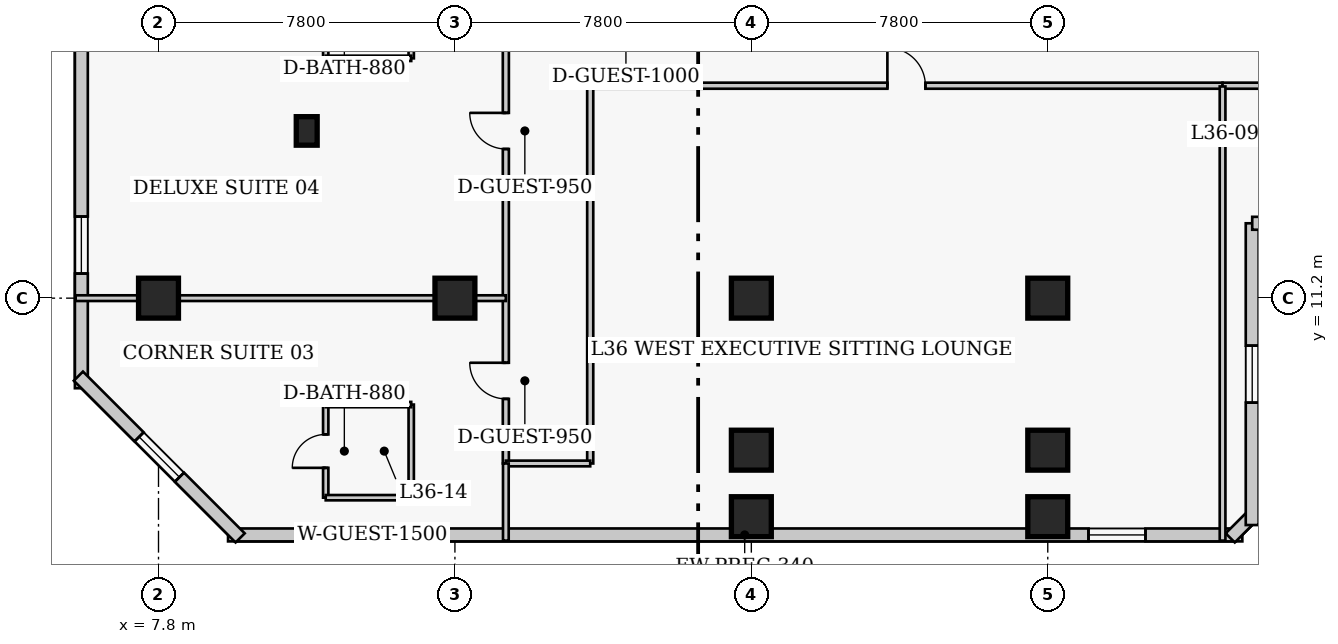
"""IFC4 building model, lengths in metres.
Left out: names, types, materials, properties, quantities, classifications, styles, units other than length and angle.
Written with IfcOpenShell. Run it as: python <this file> out.ifc"""

import sys

from ifc_helpers import new_model, si_unit, direction, frame, frame_2d, origin, origin_2d, place, context, subcontext, project, spatial, rectangle, extrude, element, fill, save


model = new_model("IFC4")
c1 = context("Model", 3, precision=1e-05, world=origin(), true_north=direction((0.0, 1.0)))
c2 = subcontext(c1, "Body", "Model", "MODEL_VIEW")
j1 = project(units=[si_unit("LENGTHUNIT", "METRE"), si_unit("PLANEANGLEUNIT", "RADIAN")], contexts=[c1])
p1 = place(None, origin())
s1 = spatial("IfcSite", under=j1, at=p1, CompositionType="ELEMENT")
p2 = place(p1, origin())
s2 = spatial("IfcBuilding", under=s1, at=p2, CompositionType="ELEMENT")
p3 = place(p2, frame((0.0, 0.0, 146.0)))
s3 = spatial("IfcBuildingStorey", under=s2, at=p3, CompositionType="ELEMENT", Elevation=146.0)
for number, where, z_axis, x_axis in (
    (1, (7.8, 11.2, 0.0), (0.0, 0.0, 1.0), (1.0, 0.0, 0.0)),
    (2, (15.6, 11.2, 0.0), (0.0, 0.0, 1.0), (1.0, 0.0, 0.0)),
    (3, (23.4, 11.2, 0.0), (0.0, 0.0, 1.0), (1.0, 0.0, 0.0)),
    (4, (31.2, 11.2, 0.0), (0.0, 0.0, 1.0), (1.0, 0.0, 0.0)),
    (5, (23.4, 7.2, 0.0), (0.0, 0.0, 1.0), (1.0, 0.0, 0.0)),
    (6, (31.2, 7.2, 0.0), (0.0, 0.0, 1.0), (1.0, 0.0, 0.0)),
    (7, (23.4, 5.45, 0.0), (0.0, 0.0, 1.0), (1.0, 0.0, 0.0)),
    (8, (31.2, 5.45, 0.0), (0.0, 0.0, 1.0), (1.0, 0.0, 0.0)),
):
    element("IfcColumn", number, at=place(p3, frame(where, z_axis=z_axis, x_axis=x_axis)), inside=s3, PredefinedType="COLUMN", context=c2, shape_type="SweptSolid", body=[
        extrude(rectangle(XDim=1.05, YDim=1.05, at=origin_2d()), origin(), (0.0, 0.0, 1.0), 3.8),
    ])
p4 = place(p3, frame((11.7, 15.6, 0.0), z_axis=(0.0, 0.0, 1.0), x_axis=(1.0, 0.0, 0.0)))
e9 = element("IfcColumn", 9, at=p4, inside=s3, PredefinedType="PILASTER", context=c2, shape_type="SweptSolid", body=[
    extrude(rectangle(XDim=0.55, YDim=0.75, at=origin_2d()), origin(), (0.0, 0.0, 1.0), 3.8),
])
p5 = place(p3, frame((9.63, 4.97, 0.0), z_axis=(0.0, 0.0, 1.0), x_axis=(1.0, 0.0, 0.0)))
e10 = element("IfcWall", 10, at=p5, inside=s3, PredefinedType="SOLIDWALL", context=c2, shape_type="SweptSolid", body=[
    extrude(rectangle(XDim=26.69, YDim=0.34, at=frame_2d((13.345, 0.0))), origin(), (0.0, 0.0, 1.0), 3.55),
])
p6 = place(p5, frame((3.048, 0.0, 0.85)))
e11 = element("IfcOpeningElement", 11, at=p6, cuts=e10, PredefinedType="OPENING", context=c2, shape_type="SweptSolid", body=[
    extrude(rectangle(XDim=1.5, YDim=1.75, at=frame_2d((0.75, 0.875))), frame((0.0, 0.18, 0.0), z_axis=(0.0, -1.0, 0.0), x_axis=(1.0, 0.0, 0.0)), (0.0, 0.0, 1.0), 0.36),
])
p7 = place(p5, frame((22.642, 0.0, 0.85)))
e12 = element("IfcOpeningElement", 12, at=p7, cuts=e10, PredefinedType="OPENING", context=c2, shape_type="SweptSolid", body=[
    extrude(rectangle(XDim=1.5, YDim=1.75, at=frame_2d((0.75, 0.875))), frame((0.0, 0.18, 0.0), z_axis=(0.0, -1.0, 0.0), x_axis=(1.0, 0.0, 0.0)), (0.0, 0.0, 1.0), 0.36),
])
p8 = place(p3, frame((36.001, 4.892, 0.0), z_axis=(0.0, 0.0, 1.0), x_axis=(0.707106781187, 0.707106781187, 0.0)))
e13 = element("IfcWall", 13, at=p8, inside=s3, PredefinedType="SOLIDWALL", context=c2, shape_type="SweptSolid", body=[
    extrude(rectangle(XDim=0.929, YDim=0.34, at=frame_2d((0.464, 0.0))), origin(), (0.0, 0.0, 1.0), 3.55),
])
p9 = place(p3, frame((36.58, 5.23, 0.0), z_axis=(0.0, 0.0, 1.0), x_axis=(0.0, 1.0, 0.0)))
e14 = element("IfcWall", 14, at=p9, inside=s3, PredefinedType="SOLIDWALL", context=c2, shape_type="SweptSolid", body=[
    extrude(rectangle(XDim=7.94, YDim=0.34, at=frame_2d((3.97, 0.0))), origin(), (0.0, 0.0, 1.0), 3.55),
])
p10 = place(p9, frame((3.22, 0.0, 0.85)))
e15 = element("IfcOpeningElement", 15, at=p10, cuts=e14, PredefinedType="OPENING", context=c2, shape_type="SweptSolid", body=[
    extrude(rectangle(XDim=1.5, YDim=1.75, at=frame_2d((0.75, 0.875))), frame((0.0, 0.18, 0.0), z_axis=(0.0, -1.0, 0.0), x_axis=(1.0, 0.0, 0.0)), (0.0, 0.0, 1.0), 0.36),
])
p11 = place(p3, frame((36.58, 13.17, 0.0), z_axis=(0.0, 0.0, 1.0), x_axis=(1.0, 0.0, 0.0)))
e16 = element("IfcWall", 16, at=p11, inside=s3, PredefinedType="SOLIDWALL", context=c2, shape_type="SweptSolid", body=[
    extrude(rectangle(XDim=4.84, YDim=0.34, at=frame_2d((2.42, 0.0))), origin(), (0.0, 0.0, 1.0), 3.55),
])
p12 = place(p11, frame((1.67, 0.0, 0.85)))
e17 = element("IfcOpeningElement", 17, at=p12, cuts=e16, PredefinedType="OPENING", context=c2, shape_type="SweptSolid", body=[
    extrude(rectangle(XDim=1.5, YDim=1.75, at=frame_2d((0.75, 0.875))), frame((0.0, 0.18, 0.0), z_axis=(0.0, -1.0, 0.0), x_axis=(1.0, 0.0, 0.0)), (0.0, 0.0, 1.0), 0.36),
])
p13 = place(p3, frame((5.77, 38.97, 0.0), z_axis=(0.0, 0.0, 1.0), x_axis=(0.0, -1.0, 0.0)))
e18 = element("IfcWall", 18, at=p13, inside=s3, PredefinedType="SOLIDWALL", context=c2, shape_type="SweptSolid", body=[
    extrude(rectangle(XDim=30.14, YDim=0.34, at=frame_2d((15.07, 0.0))), origin(), (0.0, 0.0, 1.0), 3.55),
])
p14 = place(p13, frame((4.167, 0.0, 0.85)))
e19 = element("IfcOpeningElement", 19, at=p14, cuts=e18, PredefinedType="OPENING", context=c2, shape_type="SweptSolid", body=[
    extrude(rectangle(XDim=1.5, YDim=1.75, at=frame_2d((0.75, 0.875))), frame((0.0, 0.18, 0.0), z_axis=(0.0, -1.0, 0.0), x_axis=(1.0, 0.0, 0.0)), (0.0, 0.0, 1.0), 0.36),
])
p15 = place(p13, frame((10.552, 0.0, 0.85)))
e20 = element("IfcOpeningElement", 20, at=p15, cuts=e18, PredefinedType="OPENING", context=c2, shape_type="SweptSolid", body=[
    extrude(rectangle(XDim=1.5, YDim=1.75, at=frame_2d((0.75, 0.875))), frame((0.0, 0.18, 0.0), z_axis=(0.0, -1.0, 0.0), x_axis=(1.0, 0.0, 0.0)), (0.0, 0.0, 1.0), 0.36),
])
p16 = place(p13, frame((16.938, 0.0, 0.85)))
e21 = element("IfcOpeningElement", 21, at=p16, cuts=e18, PredefinedType="OPENING", context=c2, shape_type="SweptSolid", body=[
    extrude(rectangle(XDim=1.5, YDim=1.75, at=frame_2d((0.75, 0.875))), frame((0.0, 0.18, 0.0), z_axis=(0.0, -1.0, 0.0), x_axis=(1.0, 0.0, 0.0)), (0.0, 0.0, 1.0), 0.36),
])
p17 = place(p13, frame((25.623, 0.0, 0.85)))
e22 = element("IfcOpeningElement", 22, at=p17, cuts=e18, PredefinedType="OPENING", context=c2, shape_type="SweptSolid", body=[
    extrude(rectangle(XDim=1.5, YDim=1.75, at=frame_2d((0.75, 0.875))), frame((0.0, 0.18, 0.0), z_axis=(0.0, -1.0, 0.0), x_axis=(1.0, 0.0, 0.0)), (0.0, 0.0, 1.0), 0.36),
])
p18 = place(p3, frame((5.692, 9.148, 0.0), z_axis=(0.0, 0.0, 1.0), x_axis=(0.707106781187, -0.707106781187, 0.0)))
e23 = element("IfcWall", 23, at=p18, inside=s3, PredefinedType="SOLIDWALL", context=c2, shape_type="SweptSolid", body=[
    extrude(rectangle(XDim=6.02, YDim=0.34, at=frame_2d((3.01, 0.0))), origin(), (0.0, 0.0, 1.0), 3.55),
])
p19 = place(p18, frame((2.26, 0.0, 0.85)))
e24 = element("IfcOpeningElement", 24, at=p19, cuts=e23, PredefinedType="OPENING", context=c2, shape_type="SweptSolid", body=[
    extrude(rectangle(XDim=1.5, YDim=1.75, at=frame_2d((0.75, 0.875))), frame((0.0, 0.18, 0.0), z_axis=(0.0, -1.0, 0.0), x_axis=(1.0, 0.0, 0.0)), (0.0, 0.0, 1.0), 0.36),
])
p20 = place(p3, frame((19.1, 16.79, 0.0), z_axis=(0.0, 0.0, 1.0), x_axis=(1.0, 0.0, 0.0)))
e25 = element("IfcWall", 25, at=p20, inside=s3, PredefinedType="PARTITIONING", context=c2, shape_type="SweptSolid", body=[
    extrude(rectangle(XDim=16.7, YDim=0.16, at=frame_2d((8.35, 0.0))), origin(), (0.0, 0.0, 1.0), 3.55),
])
p21 = place(p20, frame((7.88, 0.0, 0.0)))
e26 = element("IfcOpeningElement", 26, at=p21, cuts=e25, PredefinedType="OPENING", context=c2, shape_type="SweptSolid", body=[
    extrude(rectangle(XDim=1.0, YDim=2.15, at=frame_2d((0.5, 1.075))), frame((0.0, 0.09, 0.0), z_axis=(0.0, -1.0, 0.0), x_axis=(1.0, 0.0, 0.0)), (0.0, 0.0, 1.0), 0.18),
])
p22 = place(p3, frame((35.8, 16.79, 0.0), z_axis=(0.0, 0.0, 1.0), x_axis=(1.0, 0.0, 0.0)))
e27 = element("IfcWall", 27, at=p22, inside=s3, PredefinedType="PARTITIONING", context=c2, shape_type="SweptSolid", body=[
    extrude(rectangle(XDim=23.2, YDim=0.16, at=frame_2d((11.6, 0.0))), origin(), (0.0, 0.0, 1.0), 3.55),
])
p23 = place(p22, frame((6.202, 0.0, 0.0)))
e28 = element("IfcOpeningElement", 28, at=p23, cuts=e27, PredefinedType="OPENING", context=c2, shape_type="SweptSolid", body=[
    extrude(rectangle(XDim=0.95, YDim=2.1, at=frame_2d((0.475, 1.05))), frame((0.0, 0.09, 0.0), z_axis=(0.0, -1.0, 0.0), x_axis=(1.0, 0.0, 0.0)), (0.0, 0.0, 1.0), 0.18),
])
p24 = place(p22, frame((13.413, 0.0, 0.0)))
e29 = element("IfcOpeningElement", 29, at=p24, cuts=e27, PredefinedType="OPENING", context=c2, shape_type="SweptSolid", body=[
    extrude(rectangle(XDim=1.0, YDim=2.15, at=frame_2d((0.5, 1.075))), frame((0.0, 0.09, 0.0), z_axis=(0.0, -1.0, 0.0), x_axis=(1.0, 0.0, 0.0)), (0.0, 0.0, 1.0), 0.18),
])
p25 = place(p22, frame((18.343, 0.0, 0.0)))
e30 = element("IfcOpeningElement", 30, at=p25, cuts=e27, PredefinedType="OPENING", context=c2, shape_type="SweptSolid", body=[
    extrude(rectangle(XDim=0.95, YDim=2.1, at=frame_2d((0.475, 1.05))), frame((0.0, 0.09, 0.0), z_axis=(0.0, -1.0, 0.0), x_axis=(1.0, 0.0, 0.0)), (0.0, 0.0, 1.0), 0.18),
])
p26 = place(p3, frame((16.94, 6.85, 0.0), z_axis=(0.0, 0.0, 1.0), x_axis=(0.0, 1.0, 0.0)))
e31 = element("IfcWall", 31, at=p26, inside=s3, PredefinedType="PARTITIONING", context=c2, shape_type="SweptSolid", body=[
    extrude(rectangle(XDim=33.8, YDim=0.16, at=frame_2d((16.9, 0.0))), origin(), (0.0, 0.0, 1.0), 3.55),
])
p27 = place(p26, frame((1.7, 0.0, 0.0)))
e32 = element("IfcOpeningElement", 32, at=p27, cuts=e31, PredefinedType="OPENING", context=c2, shape_type="SweptSolid", body=[
    extrude(rectangle(XDim=0.95, YDim=2.1, at=frame_2d((0.475, 1.05))), frame((0.0, 0.09, 0.0), z_axis=(0.0, -1.0, 0.0), x_axis=(1.0, 0.0, 0.0)), (0.0, 0.0, 1.0), 0.18),
])
p28 = place(p26, frame((8.275, 0.0, 0.0)))
e33 = element("IfcOpeningElement", 33, at=p28, cuts=e31, PredefinedType="OPENING", context=c2, shape_type="SweptSolid", body=[
    extrude(rectangle(XDim=0.95, YDim=2.1, at=frame_2d((0.475, 1.05))), frame((0.0, 0.09, 0.0), z_axis=(0.0, -1.0, 0.0), x_axis=(1.0, 0.0, 0.0)), (0.0, 0.0, 1.0), 0.18),
])
p29 = place(p26, frame((17.075, 0.0, 0.0)))
e34 = element("IfcOpeningElement", 34, at=p29, cuts=e31, PredefinedType="OPENING", context=c2, shape_type="SweptSolid", body=[
    extrude(rectangle(XDim=0.95, YDim=2.1, at=frame_2d((0.475, 1.05))), frame((0.0, 0.09, 0.0), z_axis=(0.0, -1.0, 0.0), x_axis=(1.0, 0.0, 0.0)), (0.0, 0.0, 1.0), 0.18),
])
p30 = place(p26, frame((24.775, 0.0, 0.0)))
e35 = element("IfcOpeningElement", 35, at=p30, cuts=e31, PredefinedType="OPENING", context=c2, shape_type="SweptSolid", body=[
    extrude(rectangle(XDim=0.95, YDim=2.1, at=frame_2d((0.475, 1.05))), frame((0.0, 0.09, 0.0), z_axis=(0.0, -1.0, 0.0), x_axis=(1.0, 0.0, 0.0)), (0.0, 0.0, 1.0), 0.18),
])
p31 = place(p26, frame((29.1, 0.0, 0.0)))
e36 = element("IfcOpeningElement", 36, at=p31, cuts=e31, PredefinedType="OPENING", context=c2, shape_type="SweptSolid", body=[
    extrude(rectangle(XDim=1.0, YDim=2.15, at=frame_2d((0.5, 1.075))), frame((0.0, 0.09, 0.0), z_axis=(0.0, -1.0, 0.0), x_axis=(1.0, 0.0, 0.0)), (0.0, 0.0, 1.0), 0.18),
])
p32 = place(p3, frame((19.16, 6.85, 0.0), z_axis=(0.0, 0.0, 1.0), x_axis=(0.0, 1.0, 0.0)))
e37 = element("IfcWall", 37, at=p32, inside=s3, PredefinedType="PARTITIONING", context=c2, shape_type="SweptSolid", body=[
    extrude(rectangle(XDim=9.94, YDim=0.16, at=frame_2d((4.97, 0.0))), origin(), (0.0, 0.0, 1.0), 3.55),
])
p33 = place(p3, frame((16.94, 6.85, 0.0), z_axis=(0.0, 0.0, 1.0), x_axis=(1.0, 0.0, 0.0)))
e38 = element("IfcWall", 38, at=p33, inside=s3, PredefinedType="PARTITIONING", context=c2, shape_type="SweptSolid", body=[
    extrude(rectangle(XDim=2.22, YDim=0.15, at=frame_2d((1.11, 0.0))), origin(), (0.0, 0.0, 1.0), 3.55),
])
p34 = place(p3, frame((35.8, 4.82, 0.0), z_axis=(0.0, 0.0, 1.0), x_axis=(0.0, 1.0, 0.0)))
e39 = element("IfcWall", 39, at=p34, inside=s3, PredefinedType="PARTITIONING", context=c2, shape_type="SweptSolid", body=[
    extrude(rectangle(XDim=11.95, YDim=0.15, at=frame_2d((5.975, 0.0))), origin(), (0.0, 0.0, 1.0), 3.55),
])
p35 = place(p3, frame((16.94, 4.82, 0.0), z_axis=(0.0, 0.0, 1.0), x_axis=(0.0, 1.0, 0.0)))
e40 = element("IfcWall", 40, at=p35, inside=s3, PredefinedType="PARTITIONING", context=c2, shape_type="SweptSolid", body=[
    extrude(rectangle(XDim=2.03, YDim=0.15, at=frame_2d((1.015, 0.0))), origin(), (0.0, 0.0, 1.0), 3.55),
])
p36 = place(p3, frame((12.2, 5.95, 0.0), z_axis=(0.0, 0.0, 1.0), x_axis=(0.0, 1.0, 0.0)))
e41 = element("IfcWall", 41, at=p36, inside=s3, PredefinedType="PLUMBINGWALL", context=c2, shape_type="SweptSolid", body=[
    extrude(rectangle(XDim=2.45, YDim=0.14, at=frame_2d((1.225, 0.0))), origin(), (0.0, 0.0, 1.0), 3.55),
])
p37 = place(p36, frame((0.785, 0.0, 0.0)))
e42 = element("IfcOpeningElement", 42, at=p37, cuts=e41, PredefinedType="OPENING", context=c2, shape_type="SweptSolid", body=[
    extrude(rectangle(XDim=0.88, YDim=2.05, at=frame_2d((0.44, 1.025))), frame((0.0, 0.08, 0.0), z_axis=(0.0, -1.0, 0.0), x_axis=(1.0, 0.0, 0.0)), (0.0, 0.0, 1.0), 0.16),
])
p38 = place(p3, frame((14.45, 5.95, 0.0), z_axis=(0.0, 0.0, 1.0), x_axis=(0.0, 1.0, 0.0)))
e43 = element("IfcWall", 43, at=p38, inside=s3, PredefinedType="PLUMBINGWALL", context=c2, shape_type="SweptSolid", body=[
    extrude(rectangle(XDim=2.45, YDim=0.14, at=frame_2d((1.225, 0.0))), origin(), (0.0, 0.0, 1.0), 3.55),
])
for number, where, z_axis, x_axis in (
    (44, (12.2, 5.95, 0.0), (0.0, 0.0, 1.0), (1.0, 0.0, 0.0)),
    (45, (12.2, 8.4, 0.0), (0.0, 0.0, 1.0), (1.0, 0.0, 0.0)),
):
    element("IfcWall", number, at=place(p3, frame(where, z_axis=z_axis, x_axis=x_axis)), inside=s3, PredefinedType="PLUMBINGWALL", context=c2, shape_type="SweptSolid", body=[
        extrude(rectangle(XDim=2.25, YDim=0.14, at=frame_2d((1.125, 0.0))), origin(), (0.0, 0.0, 1.0), 3.55),
    ])
p39 = place(p3, frame((5.62, 11.2, 0.0), z_axis=(0.0, 0.0, 1.0), x_axis=(1.0, 0.0, 0.0)))
e46 = element("IfcWall", 46, at=p39, inside=s3, PredefinedType="PARTITIONING", context=c2, shape_type="SweptSolid", body=[
    extrude(rectangle(XDim=11.32, YDim=0.15, at=frame_2d((5.66, 0.0))), origin(), (0.0, 0.0, 1.0), 2.778),
])
p40 = place(p3, frame((12.2, 17.51, 0.0), z_axis=(0.0, 0.0, 1.0), x_axis=(0.0, 1.0, 0.0)))
e47 = element("IfcWall", 47, at=p40, inside=s3, PredefinedType="PLUMBINGWALL", context=c2, shape_type="SweptSolid", body=[
    extrude(rectangle(XDim=2.45, YDim=0.14, at=frame_2d((1.225, 0.0))), origin(), (0.0, 0.0, 1.0), 3.55),
])
p41 = place(p40, frame((0.785, 0.0, 0.0)))
e48 = element("IfcOpeningElement", 48, at=p41, cuts=e47, PredefinedType="OPENING", context=c2, shape_type="SweptSolid", body=[
    extrude(rectangle(XDim=0.88, YDim=2.05, at=frame_2d((0.44, 1.025))), frame((0.0, 0.08, 0.0), z_axis=(0.0, -1.0, 0.0), x_axis=(1.0, 0.0, 0.0)), (0.0, 0.0, 1.0), 0.16),
])
p42 = place(p3, frame((14.45, 17.51, 0.0), z_axis=(0.0, 0.0, 1.0), x_axis=(0.0, 1.0, 0.0)))
e49 = element("IfcWall", 49, at=p42, inside=s3, PredefinedType="PLUMBINGWALL", context=c2, shape_type="SweptSolid", body=[
    extrude(rectangle(XDim=2.45, YDim=0.14, at=frame_2d((1.225, 0.0))), origin(), (0.0, 0.0, 1.0), 3.55),
])
p43 = place(p3, frame((12.2, 17.51, 0.0), z_axis=(0.0, 0.0, 1.0), x_axis=(1.0, 0.0, 0.0)))
e50 = element("IfcWall", 50, at=p43, inside=s3, PredefinedType="PLUMBINGWALL", context=c2, shape_type="SweptSolid", body=[
    extrude(rectangle(XDim=2.25, YDim=0.14, at=frame_2d((1.125, 0.0))), origin(), (0.0, 0.0, 1.0), 3.55),
])
p44 = place(p6, origin())
e51 = element("IfcWindow", 51, at=p44, inside=s3, PartitioningType="SINGLE_PANEL", PredefinedType="WINDOW", context=c2, shape_type="SweptSolid", body=[
    extrude(rectangle(XDim=1.5, YDim=1.75, at=frame_2d((0.75, 0.875))), frame((0.0, 0.03, 0.0), z_axis=(0.0, -1.0, 0.0), x_axis=(1.0, 0.0, 0.0)), (0.0, 0.0, 1.0), 0.06),
])
fill(e11, e51)
p45 = place(p7, origin())
e52 = element("IfcWindow", 52, at=p45, inside=s3, PartitioningType="SINGLE_PANEL", PredefinedType="WINDOW", context=c2, shape_type="SweptSolid", body=[
    extrude(rectangle(XDim=1.5, YDim=1.75, at=frame_2d((0.75, 0.875))), frame((0.0, 0.03, 0.0), z_axis=(0.0, -1.0, 0.0), x_axis=(1.0, 0.0, 0.0)), (0.0, 0.0, 1.0), 0.06),
])
fill(e12, e52)
p46 = place(p10, origin())
e53 = element("IfcWindow", 53, at=p46, inside=s3, PartitioningType="SINGLE_PANEL", PredefinedType="WINDOW", context=c2, shape_type="SweptSolid", body=[
    extrude(rectangle(XDim=1.5, YDim=1.75, at=frame_2d((0.75, 0.875))), frame((0.0, 0.03, 0.0), z_axis=(0.0, -1.0, 0.0), x_axis=(1.0, 0.0, 0.0)), (0.0, 0.0, 1.0), 0.06),
])
fill(e15, e53)
p47 = place(p17, origin())
e54 = element("IfcWindow", 54, at=p47, inside=s3, PartitioningType="SINGLE_PANEL", PredefinedType="WINDOW", context=c2, shape_type="SweptSolid", body=[
    extrude(rectangle(XDim=1.5, YDim=1.75, at=frame_2d((0.75, 0.875))), frame((0.0, 0.03, 0.0), z_axis=(0.0, -1.0, 0.0), x_axis=(1.0, 0.0, 0.0)), (0.0, 0.0, 1.0), 0.06),
])
fill(e22, e54)
p48 = place(p19, origin())
e55 = element("IfcWindow", 55, at=p48, inside=s3, PartitioningType="SINGLE_PANEL", PredefinedType="WINDOW", context=c2, shape_type="SweptSolid", body=[
    extrude(rectangle(XDim=1.5, YDim=1.75, at=frame_2d((0.75, 0.875))), frame((0.0, 0.03, 0.0), z_axis=(0.0, -1.0, 0.0), x_axis=(1.0, 0.0, 0.0)), (0.0, 0.0, 1.0), 0.06),
])
fill(e24, e55)
p49 = place(p21, origin())
e56 = element("IfcDoor", 56, at=p49, inside=s3, OperationType="SINGLE_SWING_LEFT", PredefinedType="DOOR", context=c2, shape_type="SweptSolid", body=[
    extrude(rectangle(XDim=1.0, YDim=2.15, at=frame_2d((0.5, 1.075))), frame((0.0, 0.025, 0.0), z_axis=(0.0, -1.0, 0.0), x_axis=(1.0, 0.0, 0.0)), (0.0, 0.0, 1.0), 0.05),
])
fill(e26, e56)
p50 = place(p37, origin())
e57 = element("IfcDoor", 57, at=p50, inside=s3, OperationType="SINGLE_SWING_LEFT", PredefinedType="DOOR", context=c2, shape_type="SweptSolid", body=[
    extrude(rectangle(XDim=0.88, YDim=2.05, at=frame_2d((0.44, 1.025))), frame((0.0, 0.025, 0.0), z_axis=(0.0, -1.0, 0.0), x_axis=(1.0, 0.0, 0.0)), (0.0, 0.0, 1.0), 0.05),
])
fill(e42, e57)
p51 = place(p27, origin())
e58 = element("IfcDoor", 58, at=p51, inside=s3, OperationType="SINGLE_SWING_RIGHT", PredefinedType="DOOR", context=c2, shape_type="SweptSolid", body=[
    extrude(rectangle(XDim=0.95, YDim=2.1, at=frame_2d((0.475, 1.05))), frame((0.0, 0.025, 0.0), z_axis=(0.0, -1.0, 0.0), x_axis=(1.0, 0.0, 0.0)), (0.0, 0.0, 1.0), 0.05),
])
fill(e32, e58)
p52 = place(p28, origin())
e59 = element("IfcDoor", 59, at=p52, inside=s3, OperationType="SINGLE_SWING_RIGHT", PredefinedType="DOOR", context=c2, shape_type="SweptSolid", body=[
    extrude(rectangle(XDim=0.95, YDim=2.1, at=frame_2d((0.475, 1.05))), frame((0.0, 0.025, 0.0), z_axis=(0.0, -1.0, 0.0), x_axis=(1.0, 0.0, 0.0)), (0.0, 0.0, 1.0), 0.05),
])
fill(e33, e59)
save(model, sys.argv[1])
